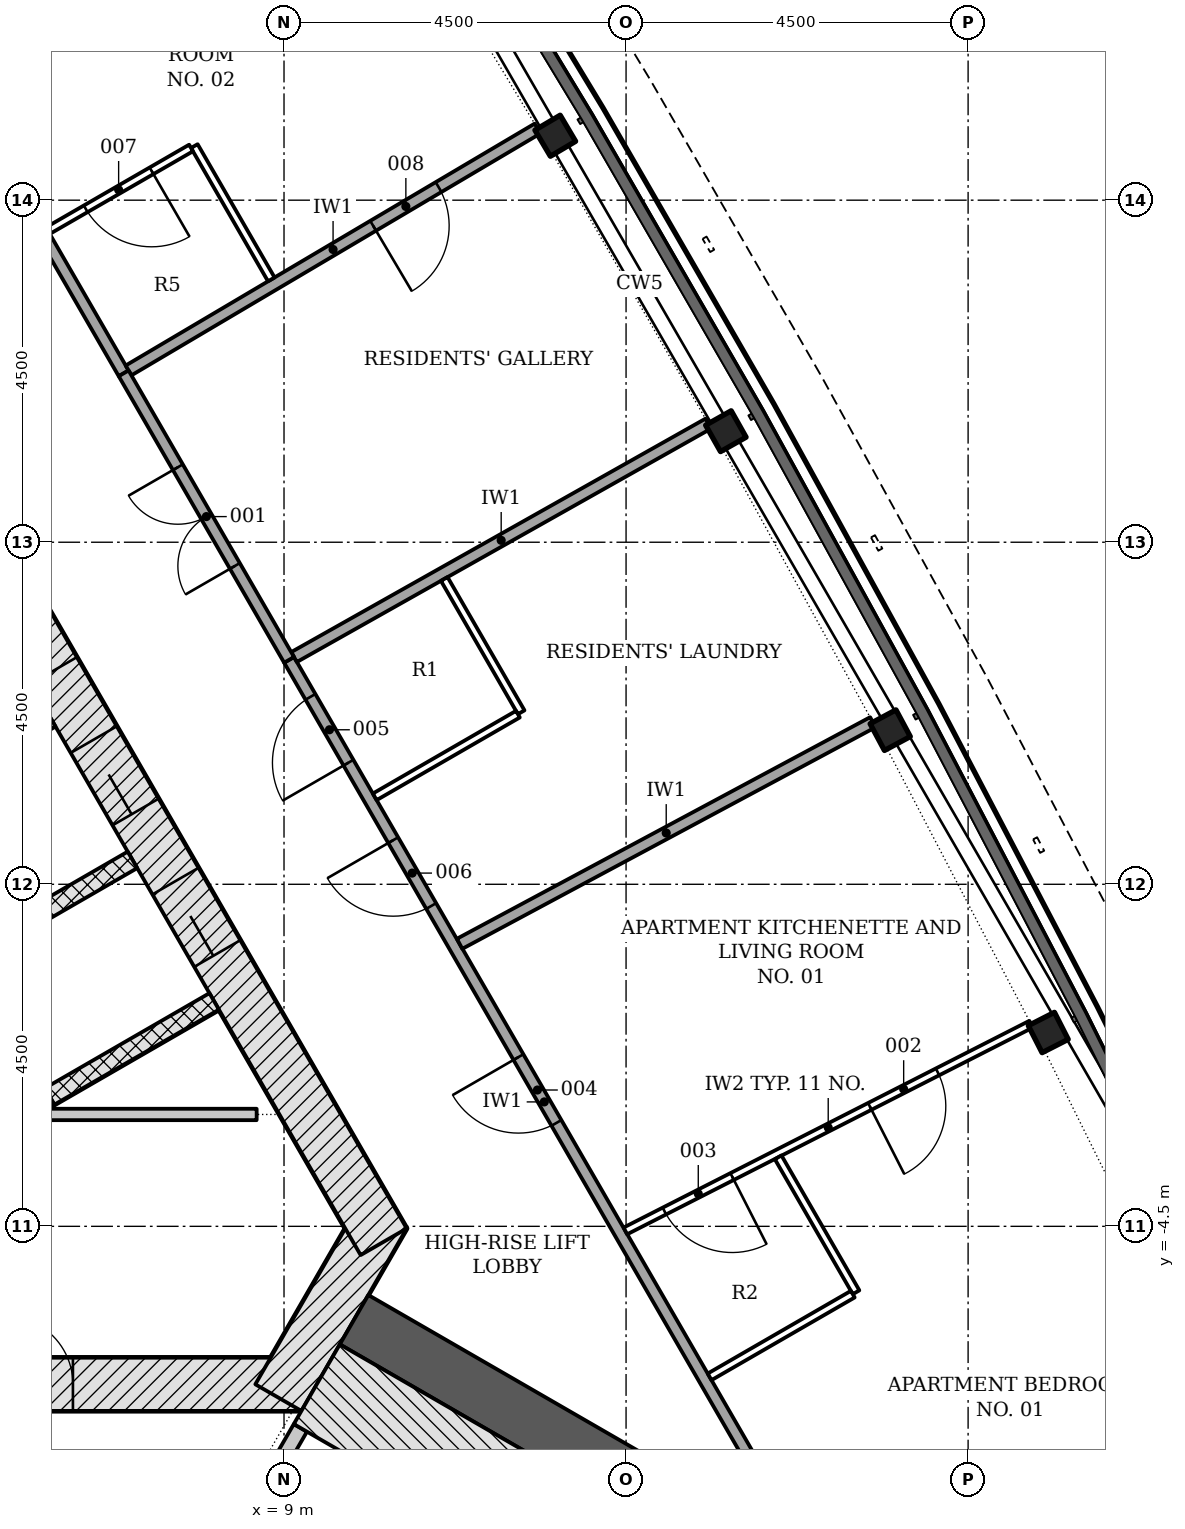
"""IFC4 building model, lengths in metres.
Left out: names, types, materials, properties, quantities, classifications, styles, units other than length and angle.
Written with IfcOpenShell. Run it as: python <this file> out.ifc"""

import sys

from ifc_helpers import new_model, si_unit, direction, frame, frame_2d, origin, origin_2d, place, context, subcontext, project, spatial, polyline, rectangle, i_section, outline, extrude, element, fill, save


model = new_model("IFC4")
c1 = context("Model", 3, precision=1e-05, world=origin(), true_north=direction((0.0, 1.0)))
c2 = subcontext(c1, "Body", "Model", "MODEL_VIEW")
j1 = project(units=[si_unit("LENGTHUNIT", "METRE"), si_unit("PLANEANGLEUNIT", "RADIAN")], contexts=[c1])
p1 = place(None, origin())
s1 = spatial("IfcSite", under=j1, at=p1, CompositionType="ELEMENT")
p2 = place(p1, origin())
s2 = spatial("IfcBuilding", under=s1, at=p2, CompositionType="ELEMENT")
p3 = place(p2, frame((0.0, 0.0, 158.1)))
s3 = spatial("IfcBuildingStorey", under=s2, at=p3, CompositionType="ELEMENT", Elevation=158.1)
p4 = place(p3, frame((-9.229, -6.578, -0.2), z_axis=(0.0, 0.0, 1.0), x_axis=(1.0, 0.0, 0.0)))
e1 = element("IfcWall", 1, at=p4, inside=s3, PredefinedType="SHEAR", context=c2, shape_type="SweptSolid", body=[
    extrude(rectangle(XDim=18.458, YDim=0.7, at=frame_2d((9.229, 0.0))), origin(), (0.0, 0.0, 1.0), 3.6),
])
p5 = place(p4, frame((10.7, 0.0, 0.2)))
e2 = element("IfcOpeningElement", 2, at=p5, cuts=e1, PredefinedType="OPENING", context=c2, shape_type="SweptSolid", body=[
    extrude(rectangle(XDim=1.0, YDim=2.1, at=frame_2d((0.5, 1.05))), frame((0.0, 0.36, 0.0), z_axis=(0.0, -1.0, 0.0), x_axis=(1.0, 0.0, 0.0)), (0.0, 0.0, 1.0), 0.72),
])
p6 = place(p4, frame((4.977, 0.0, 0.2)))
e3 = element("IfcOpeningElement", 3, at=p6, cuts=e1, PredefinedType="OPENING", context=c2, shape_type="SweptSolid", body=[
    extrude(rectangle(XDim=0.9, YDim=2.1, at=frame_2d((0.45, 1.05))), frame((0.0, 0.36, 0.0), z_axis=(0.0, -1.0, 0.0), x_axis=(1.0, 0.0, 0.0)), (0.0, 0.0, 1.0), 0.72),
])
p7 = place(p4, frame((14.552, 0.0, 0.2)))
e4 = element("IfcOpeningElement", 4, at=p7, cuts=e1, PredefinedType="OPENING", context=c2, shape_type="SweptSolid", body=[
    extrude(rectangle(XDim=0.9, YDim=2.1, at=frame_2d((0.45, 1.05))), frame((0.0, 0.36, 0.0), z_axis=(0.0, -1.0, 0.0), x_axis=(1.0, 0.0, 0.0)), (0.0, 0.0, 1.0), 0.72),
])
p8 = place(p3, frame((8.926, -6.753, -0.2), z_axis=(0.0, 0.0, 1.0), x_axis=(0.500042739161, 0.866000726912, 0.0)))
e5 = element("IfcWall", 5, at=p8, inside=s3, PredefinedType="SHEAR", context=c2, shape_type="SweptSolid", body=[
    extrude(rectangle(XDim=2.771, YDim=0.7, at=frame_2d((1.386, 0.0))), origin(), (0.0, 0.0, 1.0), 3.6),
])
p9 = place(p3, frame((10.311, -4.703, -0.2), z_axis=(0.0, 0.0, 1.0), x_axis=(-0.500001446645, 0.866024568562, 0.0)))
e6 = element("IfcWall", 6, at=p9, inside=s3, PredefinedType="SHEAR", context=c2, shape_type="SweptSolid", body=[
    extrude(rectangle(XDim=18.458, YDim=0.7, at=frame_2d((9.229, 0.0))), origin(), (0.0, 0.0, 1.0), 3.6),
])
p10 = place(p9, frame((4.379, 0.0, 0.2)))
e7 = element("IfcOpeningElement", 7, at=p10, cuts=e6, PredefinedType="OPENING", context=c2, shape_type="SweptSolid", body=[
    extrude(rectangle(XDim=1.1, YDim=2.1, at=frame_2d((0.55, 1.05))), frame((0.0, 0.36, 0.0), z_axis=(0.0, -1.0, 0.0), x_axis=(1.0, 0.0, 0.0)), (0.0, 0.0, 1.0), 0.72),
])
p11 = place(p9, frame((6.529, 0.0, 0.2)))
e8 = element("IfcOpeningElement", 8, at=p11, cuts=e6, PredefinedType="OPENING", context=c2, shape_type="SweptSolid", body=[
    extrude(rectangle(XDim=1.1, YDim=2.1, at=frame_2d((0.55, 1.05))), frame((0.0, 0.36, 0.0), z_axis=(0.0, -1.0, 0.0), x_axis=(1.0, 0.0, 0.0)), (0.0, 0.0, 1.0), 0.72),
])
p12 = place(p9, frame((8.679, 0.0, 0.2)))
e9 = element("IfcOpeningElement", 9, at=p12, cuts=e6, PredefinedType="OPENING", context=c2, shape_type="SweptSolid", body=[
    extrude(rectangle(XDim=1.1, YDim=2.1, at=frame_2d((0.55, 1.05))), frame((0.0, 0.36, 0.0), z_axis=(0.0, -1.0, 0.0), x_axis=(1.0, 0.0, 0.0)), (0.0, 0.0, 1.0), 0.72),
])
p13 = place(p9, frame((10.829, 0.0, 0.2)))
e10 = element("IfcOpeningElement", 10, at=p13, cuts=e6, PredefinedType="OPENING", context=c2, shape_type="SweptSolid", body=[
    extrude(rectangle(XDim=1.1, YDim=2.1, at=frame_2d((0.55, 1.05))), frame((0.0, 0.36, 0.0), z_axis=(0.0, -1.0, 0.0), x_axis=(1.0, 0.0, 0.0)), (0.0, 0.0, 1.0), 0.72),
])
p14 = place(p9, frame((12.979, 0.0, 0.2)))
e11 = element("IfcOpeningElement", 11, at=p14, cuts=e6, PredefinedType="OPENING", context=c2, shape_type="SweptSolid", body=[
    extrude(rectangle(XDim=1.1, YDim=2.1, at=frame_2d((0.55, 1.05))), frame((0.0, 0.36, 0.0), z_axis=(0.0, -1.0, 0.0), x_axis=(1.0, 0.0, 0.0)), (0.0, 0.0, 1.0), 0.72),
])
p15 = place(p3, frame((9.922, -5.728, -0.2), z_axis=(0.0, 0.0, 1.0), x_axis=(0.866025410072, -0.499999989109, 0.0)))
e12 = element("IfcWall", 12, at=p15, inside=s3, PredefinedType="SHEAR", context=c2, shape_type="SweptSolid", body=[
    extrude(rectangle(XDim=10.331, YDim=0.75, at=frame_2d((5.165, 0.0))), origin(), (0.0, 0.0, 1.0), 3.6),
])
for number, where, z_axis, x_axis in (
    (13, (19.055, -1.95, -0.2), (0.0, 0.0, 1.0), (-0.454, 0.891, 0.0)),
    (14, (16.975, 2.028, -0.2), (0.0, 0.0, 1.0), (-0.473, 0.881, 0.0)),
    (15, (14.813, 5.961, -0.2), (0.0, 0.0, 1.0), (-0.491, 0.871, 0.0)),
    (16, (12.569, 9.848, -0.2), (0.0, 0.0, 1.0), (-0.509, 0.861, 0.0)),
):
    element("IfcColumn", number, at=place(p3, frame(where, z_axis=z_axis, x_axis=x_axis)), inside=s3, PredefinedType="COLUMN", context=c2, shape_type="SweptSolid", body=[
        extrude(i_section(OverallWidth=0.399, OverallDepth=0.386, WebThickness=0.021, FlangeThickness=0.033, FilletRadius=0.015, at=origin_2d()), origin(), (0.0, 0.0, 1.0), 3.6),
    ])
p16 = place(p3, origin())
e17 = element("IfcWall", 17, at=p16, inside=s3, PredefinedType="NOTDEFINED", context=c2, shape_type="SweptSolid", body=[
    extrude(outline(polyline([(15.736, -15.793), (18.327, -15.587), (19.739, -15.267), (21.011, -14.576), (22.049, -13.566), (22.773, -12.312), (23.129, -10.908), (23.092, -9.461), (22.663, -8.078), (21.545, -5.731), (21.275, -5.86), (22.382, -8.187), (22.793, -9.51), (22.828, -10.875), (22.492, -12.198), (21.81, -13.38), (20.832, -14.333), (19.632, -14.984), (18.281, -15.29), (15.712, -15.494), (15.736, -15.793)])), origin(), (0.0, 0.0, 1.0), 3.3),
])
for number, where, z_axis, x_axis in (
    (18, (8.081, -1.541, -0.2), (0.0, 0.0, 1.0), (-0.866, -0.5, 0.0)),
    (19, (7.006, 0.321, -0.2), (0.0, 0.0, 1.0), (-0.866, -0.5, 0.0)),
):
    element("IfcWall", number, at=place(p3, frame(where, z_axis=z_axis, x_axis=x_axis)), inside=s3, PredefinedType="PARTITIONING", context=c2, shape_type="SweptSolid", body=[
        extrude(rectangle(XDim=2.5, YDim=0.25, at=frame_2d((1.25, 0.0))), origin(), (0.0, 0.0, 1.0), 3.6),
    ])
p17 = place(p3, frame((5.931, 2.183, -0.2), z_axis=(0.0, 0.0, 1.0), x_axis=(-0.866047370643, -0.499961950354, 0.0)))
e20 = element("IfcWall", 20, at=p17, inside=s3, PredefinedType="PARTITIONING", context=c2, shape_type="SweptSolid", body=[
    extrude(rectangle(XDim=2.5, YDim=0.25, at=frame_2d((1.25, 0.0))), origin(), (0.0, 0.0, 1.0), 3.6),
])
p18 = place(p3, frame((5.87, -2.961, 0.0), z_axis=(0.0, 0.0, 1.0), x_axis=(-0.50000615651, 0.866021849293, 0.0)))
e21 = element("IfcWall", 21, at=p18, inside=s3, PredefinedType="PARTITIONING", context=c2, shape_type="SweptSolid", body=[
    extrude(rectangle(XDim=11.0, YDim=0.25, at=frame_2d((5.5, 0.0))), origin(), (0.0, 0.0, 1.0), 3.4),
])
p19 = place(p3, frame((3.096, -3.028, 0.0), z_axis=(0.0, 0.0, 1.0), x_axis=(1.0, 0.0, 0.0)))
e22 = element("IfcWall", 22, at=p19, inside=s3, PredefinedType="PARTITIONING", context=c2, shape_type="SweptSolid", body=[
    extrude(rectangle(XDim=5.544, YDim=0.15, at=frame_2d((2.772, 0.0))), origin(), (0.0, 0.0, 1.0), 3.4),
])
p20 = place(p3, frame((7.44, -10.226, -0.2), z_axis=(0.0, 0.0, 1.0), x_axis=(0.500022077904, 0.866012656725, 0.0)))
e23 = element("IfcWall", 23, at=p20, inside=s3, PredefinedType="SHEAR", context=c2, shape_type="SweptSolid", body=[
    extrude(rectangle(XDim=3.55, YDim=0.2, at=frame_2d((1.775, 0.0))), origin(), (0.0, 0.0, 1.0), 3.6),
])
p21 = place(p20, frame((1.175, 0.0, 0.2)))
e24 = element("IfcOpeningElement", 24, at=p21, cuts=e23, PredefinedType="OPENING", context=c2, shape_type="SweptSolid", body=[
    extrude(rectangle(XDim=1.2, YDim=2.1, at=frame_2d((0.6, 1.05))), frame((0.0, 0.11, 0.0), z_axis=(0.0, -1.0, 0.0), x_axis=(1.0, 0.0, 0.0)), (0.0, 0.0, 1.0), 0.22),
])
p22 = place(p3, frame((9.431, -6.577, -0.2), z_axis=(0.0, 0.0, 1.0), x_axis=(0.866018442252, -0.500012057535, 0.0)))
e25 = element("IfcWall", 25, at=p22, inside=s3, PredefinedType="SHEAR", context=c2, shape_type="SweptSolid", body=[
    extrude(rectangle(XDim=7.2, YDim=1.211, at=frame_2d((3.6, 0.0))), origin(), (0.0, 0.0, 1.0), 3.6),
])
p23 = place(p3, frame((15.782, -8.679, 0.0), z_axis=(0.0, 0.0, 1.0), x_axis=(-0.499998343211, 0.86602636033, 0.0)))
e26 = element("IfcWall", 26, at=p23, inside=s3, PredefinedType="PARTITIONING", context=c2, shape_type="SweptSolid", body=[
    extrude(rectangle(XDim=13.431, YDim=0.15, at=frame_2d((6.715, 0.0))), origin(), (0.0, 0.0, 1.0), 2.847),
])
p24 = place(p23, frame((6.396, 0.0, 0.0)))
e27 = element("IfcOpeningElement", 27, at=p24, cuts=e26, PredefinedType="OPENING", context=c2, shape_type="SweptSolid", body=[
    extrude(rectangle(XDim=1.0, YDim=2.1, at=frame_2d((0.5, 1.05))), frame((0.0, 0.085, 0.0), z_axis=(0.0, -1.0, 0.0), x_axis=(1.0, 0.0, 0.0)), (0.0, 0.0, 1.0), 0.17),
])
p25 = place(p23, frame((11.869, 0.0, 0.0)))
e28 = element("IfcOpeningElement", 28, at=p25, cuts=e26, PredefinedType="OPENING", context=c2, shape_type="SweptSolid", body=[
    extrude(rectangle(XDim=1.0, YDim=2.1, at=frame_2d((0.5, 1.05))), frame((0.0, 0.085, 0.0), z_axis=(0.0, -1.0, 0.0), x_axis=(1.0, 0.0, 0.0)), (0.0, 0.0, 1.0), 0.17),
])
p26 = place(p23, frame((9.691, 0.0, 0.0)))
e29 = element("IfcOpeningElement", 29, at=p26, cuts=e26, PredefinedType="OPENING", context=c2, shape_type="SweptSolid", body=[
    extrude(rectangle(XDim=1.0, YDim=2.1, at=frame_2d((0.5, 1.05))), frame((0.0, 0.085, 0.0), z_axis=(0.0, -1.0, 0.0), x_axis=(1.0, 0.0, 0.0)), (0.0, 0.0, 1.0), 0.17),
])
p27 = place(p3, frame((6.89, 6.722, 0.0), z_axis=(0.0, 0.0, 1.0), x_axis=(-0.500025224267, 0.866010840057, 0.0)))
e30 = element("IfcWall", 30, at=p27, inside=s3, PredefinedType="PARTITIONING", context=c2, shape_type="SweptSolid", body=[
    extrude(rectangle(XDim=5.351, YDim=0.15, at=frame_2d((2.676, 0.0))), origin(), (0.0, 0.0, 1.0), 2.847),
])
p28 = place(p3, frame((14.582, 6.06, 0.0), z_axis=(0.0, 0.0, 1.0), x_axis=(-0.871229292109, -0.490876278272, 0.0)))
e31 = element("IfcWall", 31, at=p28, inside=s3, PredefinedType="PARTITIONING", context=c2, shape_type="SweptSolid", body=[
    extrude(rectangle(XDim=6.256, YDim=0.15, at=frame_2d((3.128, 0.0))), origin(), (0.0, 0.0, 1.0), 3.4),
])
p29 = place(p3, frame((12.336, 9.943, 0.0), z_axis=(0.0, 0.0, 1.0), x_axis=(-0.860742216303, -0.509041095663, 0.0)))
e32 = element("IfcWall", 32, at=p29, inside=s3, PredefinedType="PARTITIONING", context=c2, shape_type="SweptSolid", body=[
    extrude(rectangle(XDim=6.252, YDim=0.15, at=frame_2d((3.126, 0.0))), origin(), (0.0, 0.0, 1.0), 3.4),
])
p30 = place(p29, frame((1.513, 0.0, 0.0)))
e33 = element("IfcOpeningElement", 33, at=p30, cuts=e32, PredefinedType="OPENING", context=c2, shape_type="SweptSolid", body=[
    extrude(rectangle(XDim=1.0, YDim=2.1, at=frame_2d((0.5, 1.05))), frame((0.0, 0.085, 0.0), z_axis=(0.0, -1.0, 0.0), x_axis=(1.0, 0.0, 0.0)), (0.0, 0.0, 1.0), 0.17),
])
p31 = place(p3, frame((9.067, 2.953, 0.0), z_axis=(0.0, 0.0, 1.0), x_axis=(-0.499987877897, 0.866032402371, 0.0)))
e34 = element("IfcWall", 34, at=p31, inside=s3, PredefinedType="PARTITIONING", context=c2, shape_type="SweptSolid", body=[
    extrude(rectangle(XDim=4.353, YDim=0.15, at=frame_2d((2.176, 0.0))), origin(), (0.0, 0.0, 1.0), 2.847),
])
p32 = place(p31, frame((1.426, 0.0, 0.0)))
e35 = element("IfcOpeningElement", 35, at=p32, cuts=e34, PredefinedType="OPENING", context=c2, shape_type="SweptSolid", body=[
    extrude(rectangle(XDim=1.5, YDim=2.1, at=frame_2d((0.75, 1.05))), frame((0.0, 0.085, 0.0), z_axis=(0.0, -1.0, 0.0), x_axis=(1.0, 0.0, 0.0)), (0.0, 0.0, 1.0), 0.17),
])
p33 = place(p3, frame((18.828, -1.841, 0.0), z_axis=(0.0, 0.0, 1.0), x_axis=(-0.891018968873, -0.453966074842, 0.0)))
e36 = element("IfcWall", 36, at=p33, inside=s3, PredefinedType="PARTITIONING", context=c2, shape_type="SweptSolid", body=[
    extrude(rectangle(XDim=5.99, YDim=0.1, at=frame_2d((2.995, 0.0))), origin(), (0.0, 0.0, 1.0), 3.4),
])
p34 = place(p33, frame((1.381, 0.0, 0.0)))
e37 = element("IfcOpeningElement", 37, at=p34, cuts=e36, PredefinedType="OPENING", context=c2, shape_type="SweptSolid", body=[
    extrude(rectangle(XDim=1.0, YDim=2.1, at=frame_2d((0.5, 1.05))), frame((0.0, 0.06, 0.0), z_axis=(0.0, -1.0, 0.0), x_axis=(1.0, 0.0, 0.0)), (0.0, 0.0, 1.0), 0.12),
])
p35 = place(p33, frame((4.414, 0.0, 0.0)))
e38 = element("IfcOpeningElement", 38, at=p35, cuts=e36, PredefinedType="OPENING", context=c2, shape_type="SweptSolid", body=[
    extrude(rectangle(XDim=1.0, YDim=2.1, at=frame_2d((0.5, 1.05))), frame((0.0, 0.06, 0.0), z_axis=(0.0, -1.0, 0.0), x_axis=(1.0, 0.0, 0.0)), (0.0, 0.0, 1.0), 0.12),
])
p36 = place(p3, frame((15.501, -3.592, 0.0), z_axis=(0.0, 0.0, 1.0), x_axis=(0.500097020274, -0.865969381856, 0.0)))
e39 = element("IfcWall", 39, at=p36, inside=s3, PredefinedType="PARTITIONING", context=c2, shape_type="SweptSolid", body=[
    extrude(rectangle(XDim=2.05, YDim=0.1, at=frame_2d((1.025, 0.0))), origin(), (0.0, 0.0, 1.0), 2.847),
])
p37 = place(p3, frame((16.483, -5.393, 0.0), z_axis=(0.0, 0.0, 1.0), x_axis=(-0.866037911478, -0.499978335414, 0.0)))
e40 = element("IfcWall", 40, at=p37, inside=s3, PredefinedType="PARTITIONING", context=c2, shape_type="SweptSolid", body=[
    extrude(rectangle(XDim=2.175, YDim=0.1, at=frame_2d((1.087, 0.0))), origin(), (0.0, 0.0, 1.0), 3.4),
])
p38 = place(p3, frame((16.747, 2.132, 0.0), z_axis=(0.0, 0.0, 1.0), x_axis=(-0.881303399969, -0.472550862028, 0.0)))
e41 = element("IfcWall", 41, at=p38, inside=s3, PredefinedType="PARTITIONING", context=c2, shape_type="SweptSolid", body=[
    extrude(rectangle(XDim=6.169, YDim=0.15, at=frame_2d((3.084, 0.0))), origin(), (0.0, 0.0, 1.0), 3.4),
])
p39 = place(p3, frame((11.108, 4.017, 0.0), z_axis=(0.0, 0.0, 1.0), x_axis=(0.500028539159, -0.866008926066, 0.0)))
e42 = element("IfcWall", 42, at=p39, inside=s3, PredefinedType="PARTITIONING", context=c2, shape_type="SweptSolid", body=[
    extrude(rectangle(XDim=2.025, YDim=0.1, at=frame_2d((1.013, 0.0))), origin(), (0.0, 0.0, 1.0), 2.847),
])
p40 = place(p3, frame((12.077, 2.238, 0.0), z_axis=(0.0, 0.0, 1.0), x_axis=(-0.866037911478, -0.499978335414, 0.0)))
e43 = element("IfcWall", 43, at=p40, inside=s3, PredefinedType="PARTITIONING", context=c2, shape_type="SweptSolid", body=[
    extrude(rectangle(XDim=2.175, YDim=0.1, at=frame_2d((1.087, 0.0))), origin(), (0.0, 0.0, 1.0), 3.4),
])
p41 = place(p3, frame((8.833, 7.958, 0.0), z_axis=(0.0, 0.0, 1.0), x_axis=(-0.499938124251, 0.866061124818, 0.0)))
e44 = element("IfcWall", 44, at=p41, inside=s3, PredefinedType="PARTITIONING", context=c2, shape_type="SweptSolid", body=[
    extrude(rectangle(XDim=2.025, YDim=0.1, at=frame_2d((1.013, 0.0))), origin(), (0.0, 0.0, 1.0), 3.4),
])
p42 = place(p3, frame((7.777, 9.687, 0.0), z_axis=(0.0, 0.0, 1.0), x_axis=(-0.866037911478, -0.499978335414, 0.0)))
e45 = element("IfcWall", 45, at=p42, inside=s3, PredefinedType="PARTITIONING", context=c2, shape_type="SweptSolid", body=[
    extrude(rectangle(XDim=2.175, YDim=0.1, at=frame_2d((1.087, 0.0))), origin(), (0.0, 0.0, 1.0), 3.4),
])
p43 = place(p42, frame((0.6, 0.0, 0.0)))
e46 = element("IfcOpeningElement", 46, at=p43, cuts=e45, PredefinedType="OPENING", context=c2, shape_type="SweptSolid", body=[
    extrude(rectangle(XDim=1.0, YDim=2.1, at=frame_2d((0.5, 1.05))), frame((0.0, 0.06, 0.0), z_axis=(0.0, -1.0, 0.0), x_axis=(1.0, 0.0, 0.0)), (0.0, 0.0, 1.0), 0.12),
])
p44 = place(p10, origin())
e47 = element("IfcDoor", 47, at=p44, inside=s3, OperationType="DOUBLE_DOOR_SLIDING", PredefinedType="DOOR", context=c2, shape_type="SweptSolid", body=[
    extrude(rectangle(XDim=1.1, YDim=2.1, at=frame_2d((0.55, 1.05))), frame((0.0, 0.025, 0.0), z_axis=(0.0, -1.0, 0.0), x_axis=(1.0, 0.0, 0.0)), (0.0, 0.0, 1.0), 0.05),
])
fill(e7, e47)
p45 = place(p11, origin())
e48 = element("IfcDoor", 48, at=p45, inside=s3, OperationType="DOUBLE_DOOR_SLIDING", PredefinedType="DOOR", context=c2, shape_type="SweptSolid", body=[
    extrude(rectangle(XDim=1.1, YDim=2.1, at=frame_2d((0.55, 1.05))), frame((0.0, 0.025, 0.0), z_axis=(0.0, -1.0, 0.0), x_axis=(1.0, 0.0, 0.0)), (0.0, 0.0, 1.0), 0.05),
])
fill(e8, e48)
p46 = place(p12, origin())
e49 = element("IfcDoor", 49, at=p46, inside=s3, OperationType="DOUBLE_DOOR_SLIDING", PredefinedType="DOOR", context=c2, shape_type="SweptSolid", body=[
    extrude(rectangle(XDim=1.1, YDim=2.1, at=frame_2d((0.55, 1.05))), frame((0.0, 0.025, 0.0), z_axis=(0.0, -1.0, 0.0), x_axis=(1.0, 0.0, 0.0)), (0.0, 0.0, 1.0), 0.05),
])
fill(e9, e49)
p47 = place(p7, origin())
e50 = element("IfcDoor", 50, at=p47, inside=s3, OperationType="SINGLE_SWING_LEFT", PredefinedType="DOOR", context=c2, shape_type="SweptSolid", body=[
    extrude(rectangle(XDim=0.9, YDim=2.1, at=frame_2d((0.45, 1.05))), frame((0.0, 0.075, 0.0), z_axis=(0.0, -1.0, 0.0), x_axis=(1.0, 0.0, 0.0)), (0.0, 0.0, 1.0), 0.15),
])
fill(e4, e50)
p48 = place(p32, origin())
e51 = element("IfcDoor", 51, at=p48, inside=s3, OperationType="DOUBLE_DOOR_SINGLE_SWING", PredefinedType="DOOR", context=c2, shape_type="SweptSolid", body=[
    extrude(rectangle(XDim=1.5, YDim=2.1, at=frame_2d((0.75, 1.05))), frame((0.0, 0.025, 0.0), z_axis=(0.0, -1.0, 0.0), x_axis=(1.0, 0.0, 0.0)), (0.0, 0.0, 1.0), 0.05),
])
fill(e35, e51)
p49 = place(p34, origin())
e52 = element("IfcDoor", 52, at=p49, inside=s3, OperationType="SINGLE_SWING_RIGHT", PredefinedType="DOOR", context=c2, shape_type="SweptSolid", body=[
    extrude(rectangle(XDim=1.0, YDim=2.1, at=frame_2d((0.5, 1.05))), frame((0.0, 0.025, 0.0), z_axis=(0.0, -1.0, 0.0), x_axis=(1.0, 0.0, 0.0)), (0.0, 0.0, 1.0), 0.05),
])
fill(e37, e52)
p50 = place(p35, origin())
e53 = element("IfcDoor", 53, at=p50, inside=s3, OperationType="SINGLE_SWING_LEFT", PredefinedType="DOOR", context=c2, shape_type="SweptSolid", body=[
    extrude(rectangle(XDim=1.0, YDim=2.1, at=frame_2d((0.5, 1.05))), frame((0.0, 0.025, 0.0), z_axis=(0.0, -1.0, 0.0), x_axis=(1.0, 0.0, 0.0)), (0.0, 0.0, 1.0), 0.05),
])
fill(e38, e53)
p51 = place(p24, origin())
e54 = element("IfcDoor", 54, at=p51, inside=s3, OperationType="SINGLE_SWING_RIGHT", PredefinedType="DOOR", context=c2, shape_type="SweptSolid", body=[
    extrude(rectangle(XDim=1.0, YDim=2.1, at=frame_2d((0.5, 1.05))), frame((0.0, 0.025, 0.0), z_axis=(0.0, -1.0, 0.0), x_axis=(1.0, 0.0, 0.0)), (0.0, 0.0, 1.0), 0.05),
])
fill(e27, e54)
p52 = place(p25, origin())
e55 = element("IfcDoor", 55, at=p52, inside=s3, OperationType="SINGLE_SWING_LEFT", PredefinedType="DOOR", context=c2, shape_type="SweptSolid", body=[
    extrude(rectangle(XDim=1.0, YDim=2.1, at=frame_2d((0.5, 1.05))), frame((0.0, 0.025, 0.0), z_axis=(0.0, -1.0, 0.0), x_axis=(1.0, 0.0, 0.0)), (0.0, 0.0, 1.0), 0.05),
])
fill(e28, e55)
p53 = place(p26, origin())
e56 = element("IfcDoor", 56, at=p53, inside=s3, OperationType="SINGLE_SWING_RIGHT", PredefinedType="DOOR", context=c2, shape_type="SweptSolid", body=[
    extrude(rectangle(XDim=1.0, YDim=2.1, at=frame_2d((0.5, 1.05))), frame((0.0, 0.025, 0.0), z_axis=(0.0, -1.0, 0.0), x_axis=(1.0, 0.0, 0.0)), (0.0, 0.0, 1.0), 0.05),
])
fill(e29, e56)
p54 = place(p43, origin())
e57 = element("IfcDoor", 57, at=p54, inside=s3, OperationType="SINGLE_SWING_LEFT", PredefinedType="DOOR", context=c2, shape_type="SweptSolid", body=[
    extrude(rectangle(XDim=1.0, YDim=2.1, at=frame_2d((0.5, 1.05))), frame((0.0, 0.025, 0.0), z_axis=(0.0, -1.0, 0.0), x_axis=(1.0, 0.0, 0.0)), (0.0, 0.0, 1.0), 0.05),
])
fill(e46, e57)
p55 = place(p30, origin())
e58 = element("IfcDoor", 58, at=p55, inside=s3, OperationType="SINGLE_SWING_RIGHT", PredefinedType="DOOR", context=c2, shape_type="SweptSolid", body=[
    extrude(rectangle(XDim=1.0, YDim=2.1, at=frame_2d((0.5, 1.05))), frame((0.0, 0.025, 0.0), z_axis=(0.0, -1.0, 0.0), x_axis=(1.0, 0.0, 0.0)), (0.0, 0.0, 1.0), 0.05),
])
fill(e33, e58)
save(model, sys.argv[1])
